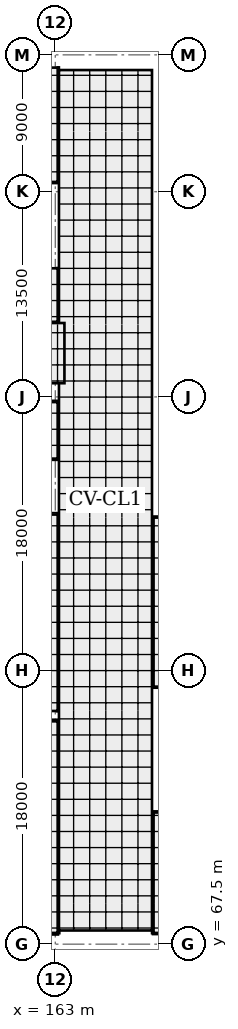
"""IFC4 building model, lengths in metres.
Left out: names, types, materials, properties, quantities, classifications, styles, units other than length and angle.
Written with IfcOpenShell. Run it as: python <this file> out.ifc"""

import sys

from ifc_helpers import new_model, si_unit, direction, frame, frame_2d, origin, origin_2d, place, context, subcontext, project, spatial, rectangle, i_section, extrude, element, fill, save


model = new_model("IFC4")
c1 = context("Model", 3, precision=1e-05, world=origin(), true_north=direction((0.0, 1.0)))
c2 = subcontext(c1, "Body", "Model", "MODEL_VIEW")
j1 = project(units=[si_unit("LENGTHUNIT", "METRE"), si_unit("PLANEANGLEUNIT", "RADIAN")], contexts=[c1])
p1 = place(None, origin())
s1 = spatial("IfcSite", under=j1, at=p1, CompositionType="ELEMENT")
p2 = place(p1, origin())
s2 = spatial("IfcBuilding", under=s1, at=p2, CompositionType="ELEMENT")
p3 = place(p2, frame((0.0, 0.0, 14.4)))
s3 = spatial("IfcBuildingStorey", under=s2, at=p3, CompositionType="ELEMENT", Elevation=14.4)
for number, where, z_axis, x_axis in (
    (1, (163.0, 67.5, 0.0), (0.0, 0.0, 1.0), (1.0, 0.0, 0.0)),
    (2, (163.0, 76.5, 0.0), (0.0, 0.0, 1.0), (1.0, 0.0, 0.0)),
    (3, (163.0, 85.5, 0.0), (0.0, 0.0, 1.0), (1.0, 0.0, 0.0)),
    (4, (163.0, 94.5, 0.0), (0.0, 0.0, 1.0), (1.0, 0.0, 0.0)),
    (5, (163.0, 103.5, 0.0), (0.0, 0.0, 1.0), (1.0, 0.0, 0.0)),
    (6, (163.0, 117.0, 0.0), (0.0, 0.0, 1.0), (1.0, 0.0, 0.0)),
    (7, (163.0, 126.0, 0.0), (0.0, 0.0, 1.0), (1.0, 0.0, 0.0)),
):
    element("IfcColumn", number, at=place(p3, frame(where, z_axis=z_axis, x_axis=x_axis)), inside=s3, PredefinedType="COLUMN", context=c2, shape_type="SweptSolid", body=[
        extrude(i_section(OverallWidth=0.4, OverallDepth=0.4, WebThickness=0.013, FlangeThickness=0.021, FilletRadius=0.022, at=origin_2d()), origin(), (0.0, 0.0, 1.0), 3.2),
    ])
p4 = place(p3, frame((163.2, 68.2, 0.0), z_axis=(0.0, 0.0, 1.0), x_axis=(-1.0, 0.0, 0.0)))
e8 = element("IfcWall", 8, at=p4, inside=s3, PredefinedType="PARTITIONING", context=c2, shape_type="SweptSolid", body=[
    extrude(rectangle(XDim=17.6, YDim=0.175, at=frame_2d((8.8, 0.0))), origin(), (0.0, 0.0, 1.0), 2.505),
])
p5 = place(p3, frame((145.6, 82.2, 0.0), z_axis=(0.0, 0.0, 1.0), x_axis=(1.0, 0.0, 0.0)))
e9 = element("IfcWall", 9, at=p5, inside=s3, PredefinedType="PARTITIONING", context=c2, shape_type="SweptSolid", body=[
    extrude(rectangle(XDim=17.6, YDim=0.175, at=frame_2d((8.8, 0.0))), origin(), (0.0, 0.0, 1.0), 2.555),
])
p6 = place(p3, frame((163.2, 82.2, 0.0), z_axis=(0.0, 0.0, 1.0), x_axis=(0.0, -1.0, 0.0)))
e10 = element("IfcWall", 10, at=p6, inside=s3, PredefinedType="PARTITIONING", context=c2, shape_type="SweptSolid", body=[
    extrude(rectangle(XDim=14.0, YDim=0.175, at=frame_2d((7.0, 0.0))), origin(), (0.0, 0.0, 1.0), 2.505),
])
p7 = place(p6, frame((6.375, 0.0, 0.0)))
e11 = element("IfcOpeningElement", 11, at=p7, cuts=e10, PredefinedType="OPENING", context=c2, shape_type="SweptSolid", body=[
    extrude(rectangle(XDim=1.25, YDim=2.1, at=frame_2d((0.625, 1.05))), frame((0.0, 0.097, 0.0), z_axis=(0.0, -1.0, 0.0), x_axis=(1.0, 0.0, 0.0)), (0.0, 0.0, 1.0), 0.195),
])
p8 = place(p3, frame((145.6, 95.8, 0.0), z_axis=(0.0, 0.0, 1.0), x_axis=(1.0, 0.0, 0.0)))
e12 = element("IfcWall", 12, at=p8, inside=s3, PredefinedType="PARTITIONING", context=c2, shape_type="SweptSolid", body=[
    extrude(rectangle(XDim=17.6, YDim=0.16, at=frame_2d((8.8, 0.0))), origin(), (0.0, 0.0, 1.0), 2.555),
])
p9 = place(p3, frame((163.2, 95.8, 0.0), z_axis=(0.0, 0.0, 1.0), x_axis=(0.0, -1.0, 0.0)))
e13 = element("IfcWall", 13, at=p9, inside=s3, PredefinedType="PARTITIONING", context=c2, shape_type="SweptSolid", body=[
    extrude(rectangle(XDim=13.0, YDim=0.16, at=frame_2d((6.5, 0.0))), origin(), (0.0, 0.0, 1.0), 2.535),
])
p10 = place(p9, frame((5.825, 0.0, 0.0)))
e14 = element("IfcOpeningElement", 14, at=p10, cuts=e13, PredefinedType="OPENING", context=c2, shape_type="SweptSolid", body=[
    extrude(rectangle(XDim=1.35, YDim=2.1, at=frame_2d((0.675, 1.05))), frame((0.0, 0.09, 0.0), z_axis=(0.0, -1.0, 0.0), x_axis=(1.0, 0.0, 0.0)), (0.0, 0.0, 1.0), 0.18),
])
p11 = place(p9, frame((8.28, 0.0, 0.0)))
e15 = element("IfcOpeningElement", 15, at=p11, cuts=e13, PredefinedType="OPENING", context=c2, shape_type="SweptSolid", body=[
    extrude(rectangle(XDim=1.35, YDim=2.1, at=frame_2d((0.675, 1.05))), frame((0.0, 0.09, 0.0), z_axis=(0.0, -1.0, 0.0), x_axis=(1.0, 0.0, 0.0)), (0.0, 0.0, 1.0), 0.18),
])
p12 = place(p3, frame((163.2, 108.4, 0.0), z_axis=(0.0, 0.0, 1.0), x_axis=(-1.0, 0.0, 0.0)))
e16 = element("IfcWall", 16, at=p12, inside=s3, PredefinedType="PARTITIONING", context=c2, shape_type="SweptSolid", body=[
    extrude(rectangle(XDim=16.6, YDim=0.15, at=frame_2d((8.3, 0.0))), origin(), (0.0, 0.0, 1.0), 2.375),
])
p13 = place(p12, frame((7.675, 0.0, 0.0)))
e17 = element("IfcOpeningElement", 17, at=p13, cuts=e16, PredefinedType="OPENING", context=c2, shape_type="SweptSolid", body=[
    extrude(rectangle(XDim=1.25, YDim=2.1, at=frame_2d((0.625, 1.05))), frame((0.0, 0.085, 0.0), z_axis=(0.0, -1.0, 0.0), x_axis=(1.0, 0.0, 0.0)), (0.0, 0.0, 1.0), 0.17),
])
p14 = place(p12, frame((12.616, 0.0, 0.0)))
e18 = element("IfcOpeningElement", 18, at=p14, cuts=e16, PredefinedType="OPENING", context=c2, shape_type="SweptSolid", body=[
    extrude(rectangle(XDim=1.25, YDim=2.1, at=frame_2d((0.625, 1.05))), frame((0.0, 0.085, 0.0), z_axis=(0.0, -1.0, 0.0), x_axis=(1.0, 0.0, 0.0)), (0.0, 0.0, 1.0), 0.17),
])
p15 = place(p3, frame((163.2, 112.0, 0.0), z_axis=(0.0, 0.0, 1.0), x_axis=(0.0, -1.0, 0.0)))
e19 = element("IfcWall", 19, at=p15, inside=s3, PredefinedType="PARTITIONING", context=c2, shape_type="SweptSolid", body=[
    extrude(rectangle(XDim=3.6, YDim=0.15, at=frame_2d((1.8, 0.0))), origin(), (0.0, 0.0, 1.0), 2.375),
])
p16 = place(p3, frame((163.2, 99.4, 0.0), z_axis=(0.0, 0.0, 1.0), x_axis=(-1.0, 0.0, 0.0)))
e20 = element("IfcWall", 20, at=p16, inside=s3, PredefinedType="PARTITIONING", context=c2, shape_type="SweptSolid", body=[
    extrude(rectangle(XDim=8.6, YDim=0.13, at=frame_2d((4.3, 0.0))), origin(), (0.0, 0.0, 1.0), 2.555),
])
p17 = place(p16, frame((3.85, 0.0, 0.0)))
e21 = element("IfcOpeningElement", 21, at=p17, cuts=e20, PredefinedType="OPENING", context=c2, shape_type="SweptSolid", body=[
    extrude(rectangle(XDim=0.9, YDim=2.1, at=frame_2d((0.45, 1.05))), frame((0.0, 0.075, 0.0), z_axis=(0.0, -1.0, 0.0), x_axis=(1.0, 0.0, 0.0)), (0.0, 0.0, 1.0), 0.15),
])
p18 = place(p3, frame((154.6, 103.2, 0.0), z_axis=(0.0, 0.0, 1.0), x_axis=(1.0, 0.0, 0.0)))
e22 = element("IfcWall", 22, at=p18, inside=s3, PredefinedType="PARTITIONING", context=c2, shape_type="SweptSolid", body=[
    extrude(rectangle(XDim=8.6, YDim=0.13, at=frame_2d((4.3, 0.0))), origin(), (0.0, 0.0, 1.0), 2.375),
])
p19 = place(p3, frame((163.2, 103.2, 0.0), z_axis=(0.0, 0.0, 1.0), x_axis=(0.0, -1.0, 0.0)))
e23 = element("IfcWall", 23, at=p19, inside=s3, PredefinedType="PARTITIONING", context=c2, shape_type="SweptSolid", body=[
    extrude(rectangle(XDim=3.8, YDim=0.13, at=frame_2d((1.9, 0.0))), origin(), (0.0, 0.0, 1.0), 2.375),
])
for number, where, z_axis, x_axis in (
    (24, (173.4, 68.2, 0.0), (0.0, 0.0, 1.0), (-1.0, 0.0, 0.0)),
    (25, (169.4, 76.2, 0.0), (0.0, 0.0, 1.0), (1.0, 0.0, 0.0)),
):
    element("IfcWall", number, at=place(p3, frame(where, z_axis=z_axis, x_axis=x_axis)), inside=s3, PredefinedType="PARTITIONING", context=c2, shape_type="SweptSolid", body=[
        extrude(rectangle(XDim=4.0, YDim=0.12, at=frame_2d((2.0, 0.0))), origin(), (0.0, 0.0, 1.0), 2.505),
    ])
p20 = place(p3, frame((169.4, 68.2, 0.0), z_axis=(0.0, 0.0, 1.0), x_axis=(0.0, 1.0, 0.0)))
e26 = element("IfcWall", 26, at=p20, inside=s3, PredefinedType="PARTITIONING", context=c2, shape_type="SweptSolid", body=[
    extrude(rectangle(XDim=8.0, YDim=0.12, at=frame_2d((4.0, 0.0))), origin(), (0.0, 0.0, 1.0), 2.505),
])
p21 = place(p20, frame((3.49, 0.0, 0.0)))
e27 = element("IfcOpeningElement", 27, at=p21, cuts=e26, PredefinedType="OPENING", context=c2, shape_type="SweptSolid", body=[
    extrude(rectangle(XDim=1.02, YDim=2.05, at=frame_2d((0.51, 1.025))), frame((0.0, 0.07, 0.0), z_axis=(0.0, -1.0, 0.0), x_axis=(1.0, 0.0, 0.0)), (0.0, 0.0, 1.0), 0.14),
])
for number, where, z_axis, x_axis in (
    (28, (173.4, 84.4, 0.0), (0.0, 0.0, 1.0), (-1.0, 0.0, 0.0)),
    (29, (169.4, 95.6, 0.0), (0.0, 0.0, 1.0), (1.0, 0.0, 0.0)),
):
    element("IfcWall", number, at=place(p3, frame(where, z_axis=z_axis, x_axis=x_axis)), inside=s3, PredefinedType="PARTITIONING", context=c2, shape_type="SweptSolid", body=[
        extrude(rectangle(XDim=4.0, YDim=0.11, at=frame_2d((2.0, 0.0))), origin(), (0.0, 0.0, 1.0), 2.585),
    ])
p22 = place(p3, frame((169.4, 84.4, 0.0), z_axis=(0.0, 0.0, 1.0), x_axis=(0.0, 1.0, 0.0)))
e30 = element("IfcWall", 30, at=p22, inside=s3, PredefinedType="PARTITIONING", context=c2, shape_type="SweptSolid", body=[
    extrude(rectangle(XDim=11.2, YDim=0.11, at=frame_2d((5.6, 0.0))), origin(), (0.0, 0.0, 1.0), 2.535),
])
p23 = place(p22, frame((5.075, 0.0, 0.0)))
e31 = element("IfcOpeningElement", 31, at=p23, cuts=e30, PredefinedType="OPENING", context=c2, shape_type="SweptSolid", body=[
    extrude(rectangle(XDim=1.05, YDim=2.1, at=frame_2d((0.525, 1.05))), frame((0.0, 0.065, 0.0), z_axis=(0.0, -1.0, 0.0), x_axis=(1.0, 0.0, 0.0)), (0.0, 0.0, 1.0), 0.13),
])
p24 = place(p3, frame((163.2, 117.6, 0.0), z_axis=(0.0, 0.0, 1.0), x_axis=(-1.0, 0.0, 0.0)))
e32 = element("IfcWall", 32, at=p24, inside=s3, PredefinedType="PARTITIONING", context=c2, shape_type="SweptSolid", body=[
    extrude(rectangle(XDim=16.0, YDim=0.12, at=frame_2d((8.0, 0.0))), origin(), (0.0, 0.0, 1.0), 2.375),
])
p25 = place(p3, frame((163.2, 125.2, 0.0), z_axis=(0.0, 0.0, 1.0), x_axis=(0.0, -1.0, 0.0)))
e33 = element("IfcWall", 33, at=p25, inside=s3, PredefinedType="PARTITIONING", context=c2, shape_type="SweptSolid", body=[
    extrude(rectangle(XDim=7.6, YDim=0.12, at=frame_2d((3.8, 0.0))), origin(), (0.0, 0.0, 1.0), 2.375),
])
p26 = place(p25, frame((3.225, 0.0, 0.0)))
e34 = element("IfcOpeningElement", 34, at=p26, cuts=e33, PredefinedType="OPENING", context=c2, shape_type="SweptSolid", body=[
    extrude(rectangle(XDim=1.15, YDim=2.1, at=frame_2d((0.575, 1.05))), frame((0.0, 0.07, 0.0), z_axis=(0.0, -1.0, 0.0), x_axis=(1.0, 0.0, 0.0)), (0.0, 0.0, 1.0), 0.14),
])
p27 = place(p7, origin())
e35 = element("IfcDoor", 35, at=p27, inside=s3, OperationType="SINGLE_SWING_LEFT", PredefinedType="DOOR", context=c2, shape_type="SweptSolid", body=[
    extrude(rectangle(XDim=1.25, YDim=2.1, at=frame_2d((0.625, 1.05))), frame((0.0, 0.025, 0.0), z_axis=(0.0, -1.0, 0.0), x_axis=(1.0, 0.0, 0.0)), (0.0, 0.0, 1.0), 0.05),
])
fill(e11, e35)
p28 = place(p10, origin())
e36 = element("IfcDoor", 36, at=p28, inside=s3, OperationType="SINGLE_SWING_RIGHT", PredefinedType="DOOR", context=c2, shape_type="SweptSolid", body=[
    extrude(rectangle(XDim=1.35, YDim=2.1, at=frame_2d((0.675, 1.05))), frame((0.0, 0.025, 0.0), z_axis=(0.0, -1.0, 0.0), x_axis=(1.0, 0.0, 0.0)), (0.0, 0.0, 1.0), 0.05),
])
fill(e14, e36)
p29 = place(p11, origin())
e37 = element("IfcDoor", 37, at=p29, inside=s3, OperationType="SINGLE_SWING_LEFT", PredefinedType="DOOR", context=c2, shape_type="SweptSolid", body=[
    extrude(rectangle(XDim=1.35, YDim=2.1, at=frame_2d((0.675, 1.05))), frame((0.0, 0.025, 0.0), z_axis=(0.0, -1.0, 0.0), x_axis=(1.0, 0.0, 0.0)), (0.0, 0.0, 1.0), 0.05),
])
fill(e15, e37)
p30 = place(p21, origin())
e38 = element("IfcDoor", 38, at=p30, inside=s3, OperationType="SINGLE_SWING_RIGHT", PredefinedType="DOOR", context=c2, shape_type="SweptSolid", body=[
    extrude(rectangle(XDim=1.02, YDim=2.05, at=frame_2d((0.51, 1.025))), frame((0.0, 0.025, 0.0), z_axis=(0.0, -1.0, 0.0), x_axis=(1.0, 0.0, 0.0)), (0.0, 0.0, 1.0), 0.05),
])
fill(e27, e38)
p31 = place(p23, origin())
e39 = element("IfcDoor", 39, at=p31, inside=s3, OperationType="SINGLE_SWING_LEFT", PredefinedType="DOOR", context=c2, shape_type="SweptSolid", body=[
    extrude(rectangle(XDim=1.05, YDim=2.1, at=frame_2d((0.525, 1.05))), frame((0.0, 0.025, 0.0), z_axis=(0.0, -1.0, 0.0), x_axis=(1.0, 0.0, 0.0)), (0.0, 0.0, 1.0), 0.05),
])
fill(e31, e39)
p32 = place(p26, origin())
e40 = element("IfcDoor", 40, at=p32, inside=s3, OperationType="SINGLE_SWING_LEFT", PredefinedType="DOOR", context=c2, shape_type="SweptSolid", body=[
    extrude(rectangle(XDim=1.15, YDim=2.1, at=frame_2d((0.575, 1.05))), frame((0.0, 0.025, 0.0), z_axis=(0.0, -1.0, 0.0), x_axis=(1.0, 0.0, 0.0)), (0.0, 0.0, 1.0), 0.05),
])
fill(e34, e40)
save(model, sys.argv[1])
